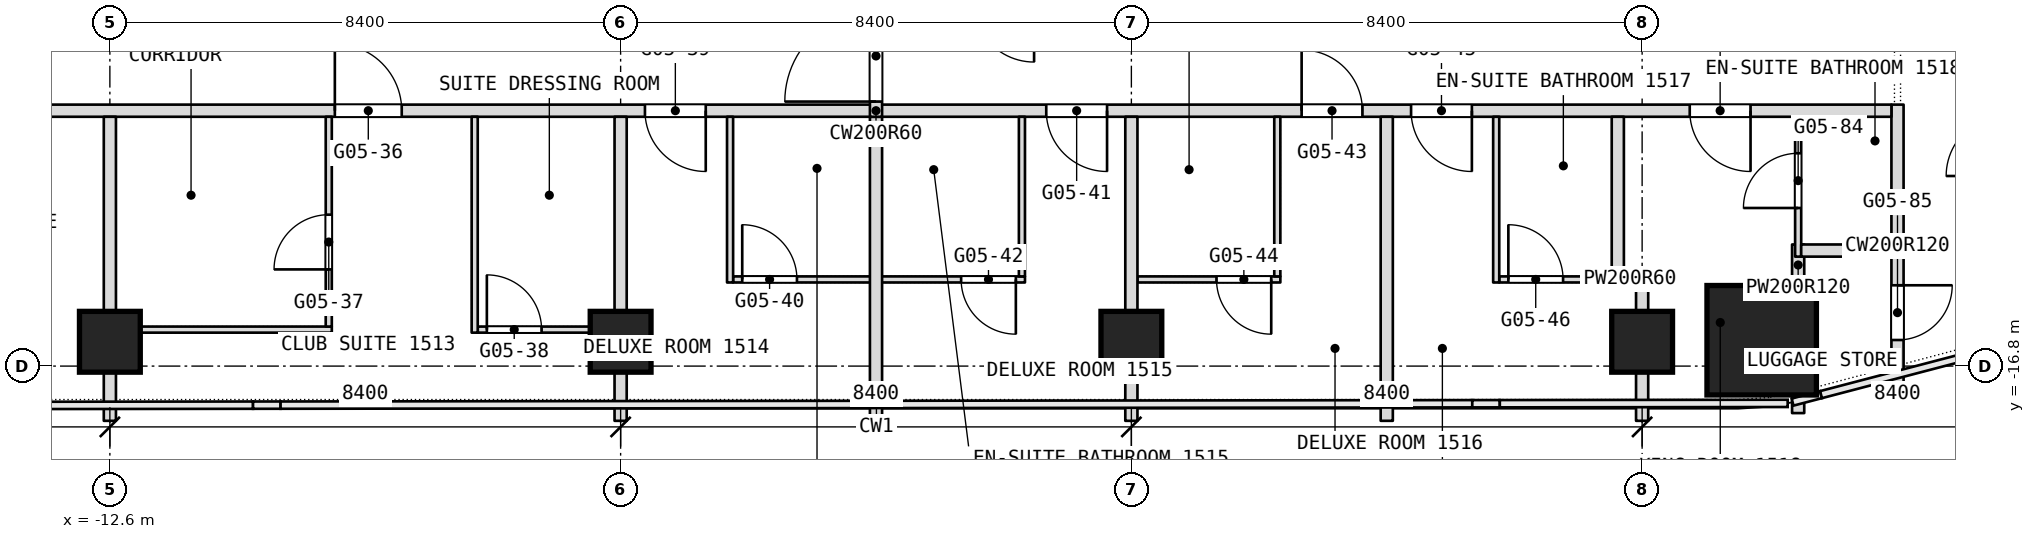
"""IFC4 building model, lengths in metres.
Left out: names, types, materials, properties, quantities, classifications, styles, units other than length and angle.
Written with IfcOpenShell. Run it as: python <this file> out.ifc"""

import sys

from ifc_helpers import new_model, si_unit, direction, frame, frame_2d, origin, origin_2d, place, context, subcontext, project, spatial, rectangle, extrude, element, fill, save


model = new_model("IFC4")
c1 = context("Model", 3, precision=1e-05, world=origin(), true_north=direction((0.0, 1.0)))
c2 = subcontext(c1, "Body", "Model", "MODEL_VIEW")
j1 = project(units=[si_unit("LENGTHUNIT", "METRE"), si_unit("PLANEANGLEUNIT", "RADIAN")], contexts=[c1])
p1 = place(None, origin())
s1 = spatial("IfcSite", under=j1, at=p1, CompositionType="ELEMENT")
p2 = place(p1, origin())
s2 = spatial("IfcBuilding", under=s1, at=p2, CompositionType="ELEMENT")
p3 = place(p2, frame((0.0, 0.0, 68.9)))
s3 = spatial("IfcBuildingStorey", under=s2, at=p3, CompositionType="ELEMENT", Elevation=68.9)
p4 = place(p3, frame((14.566, -16.375, 0.0), z_axis=(0.0, 0.0, 1.0), x_axis=(1.0, 0.0, 0.0)))
e1 = element("IfcColumn", 1, at=p4, inside=s3, PredefinedType="COLUMN", context=c2, shape_type="SweptSolid", body=[
    extrude(rectangle(XDim=1.8, YDim=1.8, at=origin_2d()), origin(), (0.0, 0.0, 1.0), 3.6),
])
for number, where, z_axis, x_axis in (
    (2, (12.6, -16.4, 0.0), (0.0, 0.0, 1.0), (1.0, 0.0, 0.0)),
    (3, (4.2, -16.4, 0.0), (0.0, 0.0, 1.0), (1.0, 0.0, 0.0)),
    (4, (-4.2, -16.4, 0.0), (0.0, 0.0, 1.0), (1.0, 0.0, 0.0)),
    (5, (-12.6, -16.4, 0.0), (0.0, 0.0, 1.0), (1.0, 0.0, 0.0)),
):
    element("IfcColumn", number, at=place(p3, frame(where, z_axis=z_axis, x_axis=x_axis)), inside=s3, PredefinedType="COLUMN", context=c2, shape_type="SweptSolid", body=[
        extrude(rectangle(XDim=1.0, YDim=1.0, at=origin_2d()), origin(), (0.0, 0.0, 1.0), 3.6),
    ])
p5 = place(p3, frame((16.8, -17.143, 0.0), z_axis=(0.0, 0.0, 1.0), x_axis=(0.0, 1.0, 0.0)))
e6 = element("IfcWall", 6, at=p5, inside=s3, PredefinedType="PARTITIONING", context=c2, shape_type="SweptSolid", body=[
    extrude(rectangle(XDim=4.643, YDim=0.2, at=frame_2d((2.322, 0.0))), origin(), (0.0, 0.0, 1.0), 3.34),
])
p6 = place(p5, frame((0.772, 0.0, 0.0)))
e7 = element("IfcOpeningElement", 7, at=p6, cuts=e6, PredefinedType="OPENING", context=c2, shape_type="SweptSolid", body=[
    extrude(rectangle(XDim=0.9, YDim=2.1, at=frame_2d((0.45, 1.05))), frame((0.0, 0.1, 0.0), z_axis=(0.0, -1.0, 0.0), x_axis=(1.0, 0.0, 0.0)), (0.0, 0.0, 1.0), 0.2),
])
p7 = place(p3, frame((-12.5, -16.2, 0.0), z_axis=(0.0, 0.0, 1.0), x_axis=(1.0, 0.0, 0.0)))
e8 = element("IfcWall", 8, at=p7, inside=s3, PredefinedType="PARTITIONING", context=c2, shape_type="SweptSolid", body=[
    extrude(rectangle(XDim=3.55, YDim=0.1, at=frame_2d((1.775, 0.0))), origin(), (0.0, 0.0, 1.0), 2.94),
])
p8 = place(p3, frame((-6.55, -16.2, 0.0), z_axis=(0.0, 0.0, 1.0), x_axis=(1.0, 0.0, 0.0)))
e9 = element("IfcWall", 9, at=p8, inside=s3, PredefinedType="PARTITIONING", context=c2, shape_type="SweptSolid", body=[
    extrude(rectangle(XDim=2.45, YDim=0.1, at=frame_2d((1.225, 0.0))), origin(), (0.0, 0.0, 1.0), 2.94),
])
p9 = place(p8, frame((0.15, 0.0, 0.0)))
e10 = element("IfcOpeningElement", 10, at=p9, cuts=e9, PredefinedType="OPENING", context=c2, shape_type="SweptSolid", body=[
    extrude(rectangle(XDim=0.9, YDim=2.1, at=frame_2d((0.45, 1.05))), frame((0.0, 0.05, 0.0), z_axis=(0.0, -1.0, 0.0), x_axis=(1.0, 0.0, 0.0)), (0.0, 0.0, 1.0), 0.1),
])
p10 = place(p3, frame((-2.35, -15.375, 0.0), z_axis=(0.0, 0.0, 1.0), x_axis=(1.0, 0.0, 0.0)))
e11 = element("IfcWall", 11, at=p10, inside=s3, PredefinedType="PARTITIONING", context=c2, shape_type="SweptSolid", body=[
    extrude(rectangle(XDim=4.8, YDim=0.1, at=frame_2d((2.4, 0.0))), origin(), (0.0, 0.0, 1.0), 3.34),
])
p11 = place(p10, frame((0.15, 0.0, 0.0)))
e12 = element("IfcOpeningElement", 12, at=p11, cuts=e11, PredefinedType="OPENING", context=c2, shape_type="SweptSolid", body=[
    extrude(rectangle(XDim=0.9, YDim=2.1, at=frame_2d((0.45, 1.05))), frame((0.0, 0.05, 0.0), z_axis=(0.0, -1.0, 0.0), x_axis=(1.0, 0.0, 0.0)), (0.0, 0.0, 1.0), 0.1),
])
p12 = place(p10, frame((3.75, 0.0, 0.0)))
e13 = element("IfcOpeningElement", 13, at=p12, cuts=e11, PredefinedType="OPENING", context=c2, shape_type="SweptSolid", body=[
    extrude(rectangle(XDim=0.9, YDim=2.1, at=frame_2d((0.45, 1.05))), frame((0.0, 0.05, 0.0), z_axis=(0.0, -1.0, 0.0), x_axis=(1.0, 0.0, 0.0)), (0.0, 0.0, 1.0), 0.1),
])
p13 = place(p3, frame((4.3, -15.375, 0.0), z_axis=(0.0, 0.0, 1.0), x_axis=(1.0, 0.0, 0.0)))
e14 = element("IfcWall", 14, at=p13, inside=s3, PredefinedType="PARTITIONING", context=c2, shape_type="SweptSolid", body=[
    extrude(rectangle(XDim=2.35, YDim=0.1, at=frame_2d((1.175, 0.0))), origin(), (0.0, 0.0, 1.0), 3.34),
])
p14 = place(p13, frame((1.3, 0.0, 0.0)))
e15 = element("IfcOpeningElement", 15, at=p14, cuts=e14, PredefinedType="OPENING", context=c2, shape_type="SweptSolid", body=[
    extrude(rectangle(XDim=0.9, YDim=2.1, at=frame_2d((0.45, 1.05))), frame((0.0, 0.05, 0.0), z_axis=(0.0, -1.0, 0.0), x_axis=(1.0, 0.0, 0.0)), (0.0, 0.0, 1.0), 0.1),
])
p15 = place(p3, frame((10.25, -15.375, 0.0), z_axis=(0.0, 0.0, 1.0), x_axis=(1.0, 0.0, 0.0)))
e16 = element("IfcWall", 16, at=p15, inside=s3, PredefinedType="PARTITIONING", context=c2, shape_type="SweptSolid", body=[
    extrude(rectangle(XDim=2.05, YDim=0.1, at=frame_2d((1.025, 0.0))), origin(), (0.0, 0.0, 1.0), 3.34),
])
p16 = place(p15, frame((0.15, 0.0, 0.0)))
e17 = element("IfcOpeningElement", 17, at=p16, cuts=e16, PredefinedType="OPENING", context=c2, shape_type="SweptSolid", body=[
    extrude(rectangle(XDim=0.9, YDim=2.1, at=frame_2d((0.45, 1.05))), frame((0.0, 0.05, 0.0), z_axis=(0.0, -1.0, 0.0), x_axis=(1.0, 0.0, 0.0)), (0.0, 0.0, 1.0), 0.1),
])
p17 = place(p3, frame((12.1, -15.375, 0.0), z_axis=(0.0, 0.0, 1.0), x_axis=(1.0, 0.0, 0.0)))
e18 = element("IfcWall", 18, at=p17, inside=s3, PredefinedType="PARTITIONING", context=c2, shape_type="SweptSolid", body=[
    extrude(rectangle(XDim=0.6, YDim=0.2, at=frame_2d((0.3, 0.0))), origin(), (0.0, 0.0, 1.0), 3.34),
])
p18 = place(p3, frame((15.166, -17.573, 0.0), z_axis=(0.0, 0.0, 1.0), x_axis=(0.0, 1.0, 0.0)))
e19 = element("IfcWall", 19, at=p18, inside=s3, PredefinedType="PARTITIONING", context=c2, shape_type="SweptSolid", body=[
    extrude(rectangle(XDim=0.298, YDim=0.2, at=frame_2d((0.149, 0.0))), origin(), (0.0, 0.0, 1.0), 3.34),
])
p19 = place(p3, frame((15.166, -15.475, 0.0), z_axis=(0.0, 0.0, 1.0), x_axis=(0.0, 1.0, 0.0)))
e20 = element("IfcWall", 20, at=p19, inside=s3, PredefinedType="PARTITIONING", context=c2, shape_type="SweptSolid", body=[
    extrude(rectangle(XDim=0.675, YDim=0.2, at=frame_2d((0.337, 0.0))), origin(), (0.0, 0.0, 1.0), 3.34),
])
p20 = place(p3, frame((15.166, -15.0, 0.0), z_axis=(0.0, 0.0, 1.0), x_axis=(0.0, 1.0, 0.0)))
e21 = element("IfcWall", 21, at=p20, inside=s3, PredefinedType="PARTITIONING", context=c2, shape_type="SweptSolid", body=[
    extrude(rectangle(XDim=2.3, YDim=0.1, at=frame_2d((1.15, 0.0))), origin(), (0.0, 0.0, 1.0), 3.34),
])
p21 = place(p20, frame((0.8, 0.0, 0.0)))
e22 = element("IfcOpeningElement", 22, at=p21, cuts=e21, PredefinedType="OPENING", context=c2, shape_type="SweptSolid", body=[
    extrude(rectangle(XDim=0.9, YDim=2.1, at=frame_2d((0.45, 1.05))), frame((0.0, 0.05, 0.0), z_axis=(0.0, -1.0, 0.0), x_axis=(1.0, 0.0, 0.0)), (0.0, 0.0, 1.0), 0.1),
])
p22 = place(p3, frame((15.216, -14.9, 0.0), z_axis=(0.0, 0.0, 1.0), x_axis=(1.0, 0.0, 0.0)))
e23 = element("IfcWall", 23, at=p22, inside=s3, PredefinedType="PARTITIONING", context=c2, shape_type="SweptSolid", body=[
    extrude(rectangle(XDim=1.484, YDim=0.2, at=frame_2d((0.742, 0.0))), origin(), (0.0, 0.0, 1.0), 3.34),
])
p23 = place(p3, frame((12.6, -17.7, 0.0), z_axis=(0.0, 0.0, 1.0), x_axis=(0.0, 1.0, 0.0)))
e24 = element("IfcWall", 24, at=p23, inside=s3, PredefinedType="PARTITIONING", context=c2, shape_type="SweptSolid", body=[
    extrude(rectangle(XDim=2.225, YDim=0.2, at=frame_2d((1.112, 0.0))), origin(), (0.0, 0.0, 1.0), 3.34),
])
p24 = place(p3, frame((-16.7, -12.6, 0.0), z_axis=(0.0, 0.0, 1.0), x_axis=(1.0, 0.0, 0.0)))
e25 = element("IfcWall", 25, at=p24, inside=s3, PredefinedType="PARTITIONING", context=c2, shape_type="SweptSolid", body=[
    extrude(rectangle(XDim=33.4, YDim=0.2, at=frame_2d((16.7, 0.0))), origin(), (0.0, 0.0, 1.0), 3.34),
])
p25 = place(p24, frame((1.5, 0.0, 0.0)))
e26 = element("IfcOpeningElement", 26, at=p25, cuts=e25, PredefinedType="OPENING", context=c2, shape_type="SweptSolid", body=[
    extrude(rectangle(XDim=1.0, YDim=2.1, at=frame_2d((0.5, 1.05))), frame((0.0, 0.1, 0.0), z_axis=(0.0, -1.0, 0.0), x_axis=(1.0, 0.0, 0.0)), (0.0, 0.0, 1.0), 0.2),
])
p26 = place(p24, frame((7.8, 0.0, 0.0)))
e27 = element("IfcOpeningElement", 27, at=p26, cuts=e25, PredefinedType="OPENING", context=c2, shape_type="SweptSolid", body=[
    extrude(rectangle(XDim=1.1, YDim=2.1, at=frame_2d((0.55, 1.05))), frame((0.0, 0.1, 0.0), z_axis=(0.0, -1.0, 0.0), x_axis=(1.0, 0.0, 0.0)), (0.0, 0.0, 1.0), 0.2),
])
p27 = place(p24, frame((12.9, 0.0, 0.0)))
e28 = element("IfcOpeningElement", 28, at=p27, cuts=e25, PredefinedType="OPENING", context=c2, shape_type="SweptSolid", body=[
    extrude(rectangle(XDim=1.0, YDim=2.1, at=frame_2d((0.5, 1.05))), frame((0.0, 0.1, 0.0), z_axis=(0.0, -1.0, 0.0), x_axis=(1.0, 0.0, 0.0)), (0.0, 0.0, 1.0), 0.2),
])
p28 = place(p24, frame((19.5, 0.0, 0.0)))
e29 = element("IfcOpeningElement", 29, at=p28, cuts=e25, PredefinedType="OPENING", context=c2, shape_type="SweptSolid", body=[
    extrude(rectangle(XDim=1.0, YDim=2.1, at=frame_2d((0.5, 1.05))), frame((0.0, 0.1, 0.0), z_axis=(0.0, -1.0, 0.0), x_axis=(1.0, 0.0, 0.0)), (0.0, 0.0, 1.0), 0.2),
])
p29 = place(p24, frame((23.7, 0.0, 0.0)))
e30 = element("IfcOpeningElement", 30, at=p29, cuts=e25, PredefinedType="OPENING", context=c2, shape_type="SweptSolid", body=[
    extrude(rectangle(XDim=1.0, YDim=2.1, at=frame_2d((0.5, 1.05))), frame((0.0, 0.1, 0.0), z_axis=(0.0, -1.0, 0.0), x_axis=(1.0, 0.0, 0.0)), (0.0, 0.0, 1.0), 0.2),
])
p30 = place(p24, frame((25.5, 0.0, 0.0)))
e31 = element("IfcOpeningElement", 31, at=p30, cuts=e25, PredefinedType="OPENING", context=c2, shape_type="SweptSolid", body=[
    extrude(rectangle(XDim=1.0, YDim=2.1, at=frame_2d((0.5, 1.05))), frame((0.0, 0.1, 0.0), z_axis=(0.0, -1.0, 0.0), x_axis=(1.0, 0.0, 0.0)), (0.0, 0.0, 1.0), 0.2),
])
p31 = place(p24, frame((30.083, 0.0, 0.0)))
e32 = element("IfcOpeningElement", 32, at=p31, cuts=e25, PredefinedType="OPENING", context=c2, shape_type="SweptSolid", body=[
    extrude(rectangle(XDim=1.0, YDim=2.1, at=frame_2d((0.5, 1.05))), frame((0.0, 0.1, 0.0), z_axis=(0.0, -1.0, 0.0), x_axis=(1.0, 0.0, 0.0)), (0.0, 0.0, 1.0), 0.2),
])
p32 = place(p3, frame((12.2, -15.325, 0.0), z_axis=(0.0, 0.0, 1.0), x_axis=(0.0, 1.0, 0.0)))
e33 = element("IfcWall", 33, at=p32, inside=s3, PredefinedType="PARTITIONING", context=c2, shape_type="SweptSolid", body=[
    extrude(rectangle(XDim=2.625, YDim=0.2, at=frame_2d((1.312, 0.0))), origin(), (0.0, 0.0, 1.0), 3.34),
])
p33 = place(p3, frame((10.2, -15.425, 0.0), z_axis=(0.0, 0.0, 1.0), x_axis=(0.0, 1.0, 0.0)))
e34 = element("IfcWall", 34, at=p33, inside=s3, PredefinedType="PARTITIONING", context=c2, shape_type="SweptSolid", body=[
    extrude(rectangle(XDim=2.725, YDim=0.1, at=frame_2d((1.363, 0.0))), origin(), (0.0, 0.0, 1.0), 3.34),
])
p34 = place(p3, frame((8.4, -17.7, 0.0), z_axis=(0.0, 0.0, 1.0), x_axis=(0.0, 1.0, 0.0)))
e35 = element("IfcWall", 35, at=p34, inside=s3, PredefinedType="PARTITIONING", context=c2, shape_type="SweptSolid", body=[
    extrude(rectangle(XDim=5.0, YDim=0.2, at=frame_2d((2.5, 0.0))), origin(), (0.0, 0.0, 1.0), 3.34),
])
p35 = place(p3, frame((6.6, -15.325, 0.0), z_axis=(0.0, 0.0, 1.0), x_axis=(0.0, 1.0, 0.0)))
e36 = element("IfcWall", 36, at=p35, inside=s3, PredefinedType="PARTITIONING", context=c2, shape_type="SweptSolid", body=[
    extrude(rectangle(XDim=2.625, YDim=0.1, at=frame_2d((1.312, 0.0))), origin(), (0.0, 0.0, 1.0), 3.34),
])
p36 = place(p3, frame((4.2, -17.7, 0.0), z_axis=(0.0, 0.0, 1.0), x_axis=(0.0, 1.0, 0.0)))
e37 = element("IfcWall", 37, at=p36, inside=s3, PredefinedType="PARTITIONING", context=c2, shape_type="SweptSolid", body=[
    extrude(rectangle(XDim=5.0, YDim=0.2, at=frame_2d((2.5, 0.0))), origin(), (0.0, 0.0, 1.0), 3.34),
])
p37 = place(p3, frame((2.4, -15.325, 0.0), z_axis=(0.0, 0.0, 1.0), x_axis=(0.0, 1.0, 0.0)))
e38 = element("IfcWall", 38, at=p37, inside=s3, PredefinedType="PARTITIONING", context=c2, shape_type="SweptSolid", body=[
    extrude(rectangle(XDim=2.625, YDim=0.1, at=frame_2d((1.312, 0.0))), origin(), (0.0, 0.0, 1.0), 3.34),
])
p38 = place(p3, frame((0.0, -17.7, 0.0), z_axis=(0.0, 0.0, 1.0), x_axis=(0.0, 1.0, 0.0)))
e39 = element("IfcWall", 39, at=p38, inside=s3, PredefinedType="PARTITIONING", context=c2, shape_type="SweptSolid", body=[
    extrude(rectangle(XDim=5.0, YDim=0.2, at=frame_2d((2.5, 0.0))), origin(), (0.0, 0.0, 1.0), 3.34),
])
p39 = place(p3, frame((0.0, -12.7, 0.0), z_axis=(0.0, 0.0, 1.0), x_axis=(0.0, 1.0, 0.0)))
e40 = element("IfcWall", 40, at=p39, inside=s3, PredefinedType="PARTITIONING", context=c2, shape_type="SweptSolid", body=[
    extrude(rectangle(XDim=12.7, YDim=0.2, at=frame_2d((6.35, 0.0))), origin(), (0.0, 0.0, 1.0), 3.34),
])
p40 = place(p39, frame((11.05, 0.0, 0.0)))
e41 = element("IfcOpeningElement", 41, at=p40, cuts=e40, PredefinedType="OPENING", context=c2, shape_type="SweptSolid", body=[
    extrude(rectangle(XDim=1.5, YDim=2.1, at=frame_2d((0.75, 1.05))), frame((0.0, 0.1, 0.0), z_axis=(0.0, -1.0, 0.0), x_axis=(1.0, 0.0, 0.0)), (0.0, 0.0, 1.0), 0.2),
])
p41 = place(p39, frame((0.25, 0.0, 0.0)))
e42 = element("IfcOpeningElement", 42, at=p41, cuts=e40, PredefinedType="OPENING", context=c2, shape_type="SweptSolid", body=[
    extrude(rectangle(XDim=1.5, YDim=2.1, at=frame_2d((0.75, 1.05))), frame((0.0, 0.1, 0.0), z_axis=(0.0, -1.0, 0.0), x_axis=(1.0, 0.0, 0.0)), (0.0, 0.0, 1.0), 0.2),
])
p42 = place(p3, frame((-2.4, -15.425, 0.0), z_axis=(0.0, 0.0, 1.0), x_axis=(0.0, 1.0, 0.0)))
e43 = element("IfcWall", 43, at=p42, inside=s3, PredefinedType="PARTITIONING", context=c2, shape_type="SweptSolid", body=[
    extrude(rectangle(XDim=2.725, YDim=0.1, at=frame_2d((1.363, 0.0))), origin(), (0.0, 0.0, 1.0), 3.34),
])
p43 = place(p3, frame((-4.2, -17.7, 0.0), z_axis=(0.0, 0.0, 1.0), x_axis=(0.0, 1.0, 0.0)))
e44 = element("IfcWall", 44, at=p43, inside=s3, PredefinedType="PARTITIONING", context=c2, shape_type="SweptSolid", body=[
    extrude(rectangle(XDim=5.0, YDim=0.2, at=frame_2d((2.5, 0.0))), origin(), (0.0, 0.0, 1.0), 3.34),
])
p44 = place(p3, frame((-6.6, -16.25, 0.0), z_axis=(0.0, 0.0, 1.0), x_axis=(0.0, 1.0, 0.0)))
e45 = element("IfcWall", 45, at=p44, inside=s3, PredefinedType="PARTITIONING", context=c2, shape_type="SweptSolid", body=[
    extrude(rectangle(XDim=3.55, YDim=0.1, at=frame_2d((1.775, 0.0))), origin(), (0.0, 0.0, 1.0), 3.34),
])
p45 = place(p3, frame((-9.0, -16.15, 0.0), z_axis=(0.0, 0.0, 1.0), x_axis=(0.0, 1.0, 0.0)))
e46 = element("IfcWall", 46, at=p45, inside=s3, PredefinedType="PARTITIONING", context=c2, shape_type="SweptSolid", body=[
    extrude(rectangle(XDim=3.45, YDim=0.1, at=frame_2d((1.725, 0.0))), origin(), (0.0, 0.0, 1.0), 3.34),
])
p46 = place(p45, frame((0.94, 0.0, 0.0)))
e47 = element("IfcOpeningElement", 47, at=p46, cuts=e46, PredefinedType="OPENING", context=c2, shape_type="SweptSolid", body=[
    extrude(rectangle(XDim=0.9, YDim=2.1, at=frame_2d((0.45, 1.05))), frame((0.0, 0.05, 0.0), z_axis=(0.0, -1.0, 0.0), x_axis=(1.0, 0.0, 0.0)), (0.0, 0.0, 1.0), 0.1),
])
p47 = place(p3, frame((-12.6, -17.7, 0.0), z_axis=(0.0, 0.0, 1.0), x_axis=(0.0, 1.0, 0.0)))
e48 = element("IfcWall", 48, at=p47, inside=s3, PredefinedType="PARTITIONING", context=c2, shape_type="SweptSolid", body=[
    extrude(rectangle(XDim=5.0, YDim=0.2, at=frame_2d((2.5, 0.0))), origin(), (0.0, 0.0, 1.0), 3.34),
])
p48 = place(p6, origin())
e49 = element("IfcDoor", 49, at=p48, inside=s3, OperationType="SINGLE_SWING_RIGHT", PredefinedType="DOOR", context=c2, shape_type="SweptSolid", body=[
    extrude(rectangle(XDim=0.9, YDim=2.1, at=frame_2d((0.45, 1.05))), frame((0.0, 0.025, 0.0), z_axis=(0.0, -1.0, 0.0), x_axis=(1.0, 0.0, 0.0)), (0.0, 0.0, 1.0), 0.05),
])
fill(e7, e49)
p49 = place(p9, origin())
e50 = element("IfcDoor", 50, at=p49, inside=s3, OperationType="SINGLE_SWING_LEFT", PredefinedType="DOOR", context=c2, shape_type="SweptSolid", body=[
    extrude(rectangle(XDim=0.9, YDim=2.1, at=frame_2d((0.45, 1.05))), frame((0.0, 0.025, 0.0), z_axis=(0.0, -1.0, 0.0), x_axis=(1.0, 0.0, 0.0)), (0.0, 0.0, 1.0), 0.05),
])
fill(e10, e50)
p50 = place(p11, origin())
e51 = element("IfcDoor", 51, at=p50, inside=s3, OperationType="SINGLE_SWING_LEFT", PredefinedType="DOOR", context=c2, shape_type="SweptSolid", body=[
    extrude(rectangle(XDim=0.9, YDim=2.1, at=frame_2d((0.45, 1.05))), frame((0.0, 0.025, 0.0), z_axis=(0.0, -1.0, 0.0), x_axis=(1.0, 0.0, 0.0)), (0.0, 0.0, 1.0), 0.05),
])
fill(e12, e51)
p51 = place(p12, origin())
e52 = element("IfcDoor", 52, at=p51, inside=s3, OperationType="SINGLE_SWING_RIGHT", PredefinedType="DOOR", context=c2, shape_type="SweptSolid", body=[
    extrude(rectangle(XDim=0.9, YDim=2.1, at=frame_2d((0.45, 1.05))), frame((0.0, 0.025, 0.0), z_axis=(0.0, -1.0, 0.0), x_axis=(1.0, 0.0, 0.0)), (0.0, 0.0, 1.0), 0.05),
])
fill(e13, e52)
p52 = place(p14, origin())
e53 = element("IfcDoor", 53, at=p52, inside=s3, OperationType="SINGLE_SWING_RIGHT", PredefinedType="DOOR", context=c2, shape_type="SweptSolid", body=[
    extrude(rectangle(XDim=0.9, YDim=2.1, at=frame_2d((0.45, 1.05))), frame((0.0, 0.025, 0.0), z_axis=(0.0, -1.0, 0.0), x_axis=(1.0, 0.0, 0.0)), (0.0, 0.0, 1.0), 0.05),
])
fill(e15, e53)
p53 = place(p16, origin())
e54 = element("IfcDoor", 54, at=p53, inside=s3, OperationType="SINGLE_SWING_LEFT", PredefinedType="DOOR", context=c2, shape_type="SweptSolid", body=[
    extrude(rectangle(XDim=0.9, YDim=2.1, at=frame_2d((0.45, 1.05))), frame((0.0, 0.025, 0.0), z_axis=(0.0, -1.0, 0.0), x_axis=(1.0, 0.0, 0.0)), (0.0, 0.0, 1.0), 0.05),
])
fill(e17, e54)
p54 = place(p21, origin())
e55 = element("IfcDoor", 55, at=p54, inside=s3, OperationType="SINGLE_SWING_RIGHT", PredefinedType="DOOR", context=c2, shape_type="SweptSolid", body=[
    extrude(rectangle(XDim=0.9, YDim=2.1, at=frame_2d((0.45, 1.05))), frame((0.0, 0.025, 0.0), z_axis=(0.0, -1.0, 0.0), x_axis=(1.0, 0.0, 0.0)), (0.0, 0.0, 1.0), 0.05),
])
fill(e22, e55)
p55 = place(p26, origin())
e56 = element("IfcDoor", 56, at=p55, inside=s3, OperationType="SINGLE_SWING_RIGHT", PredefinedType="DOOR", context=c2, shape_type="SweptSolid", body=[
    extrude(rectangle(XDim=1.1, YDim=2.1, at=frame_2d((0.55, 1.05))), frame((0.0, 0.025, 0.0), z_axis=(0.0, -1.0, 0.0), x_axis=(1.0, 0.0, 0.0)), (0.0, 0.0, 1.0), 0.05),
])
fill(e27, e56)
p56 = place(p27, origin())
e57 = element("IfcDoor", 57, at=p56, inside=s3, OperationType="SINGLE_SWING_LEFT", PredefinedType="DOOR", context=c2, shape_type="SweptSolid", body=[
    extrude(rectangle(XDim=1.0, YDim=2.1, at=frame_2d((0.5, 1.05))), frame((0.0, 0.025, 0.0), z_axis=(0.0, -1.0, 0.0), x_axis=(1.0, 0.0, 0.0)), (0.0, 0.0, 1.0), 0.05),
])
fill(e28, e57)
p57 = place(p28, origin())
e58 = element("IfcDoor", 58, at=p57, inside=s3, OperationType="SINGLE_SWING_LEFT", PredefinedType="DOOR", context=c2, shape_type="SweptSolid", body=[
    extrude(rectangle(XDim=1.0, YDim=2.1, at=frame_2d((0.5, 1.05))), frame((0.0, 0.025, 0.0), z_axis=(0.0, -1.0, 0.0), x_axis=(1.0, 0.0, 0.0)), (0.0, 0.0, 1.0), 0.05),
])
fill(e29, e58)
p58 = place(p29, origin())
e59 = element("IfcDoor", 59, at=p58, inside=s3, OperationType="SINGLE_SWING_LEFT", PredefinedType="DOOR", context=c2, shape_type="SweptSolid", body=[
    extrude(rectangle(XDim=1.0, YDim=2.1, at=frame_2d((0.5, 1.05))), frame((0.0, 0.025, 0.0), z_axis=(0.0, -1.0, 0.0), x_axis=(1.0, 0.0, 0.0)), (0.0, 0.0, 1.0), 0.05),
])
fill(e30, e59)
p59 = place(p30, origin())
e60 = element("IfcDoor", 60, at=p59, inside=s3, OperationType="SINGLE_SWING_LEFT", PredefinedType="DOOR", context=c2, shape_type="SweptSolid", body=[
    extrude(rectangle(XDim=1.0, YDim=2.1, at=frame_2d((0.5, 1.05))), frame((0.0, 0.025, 0.0), z_axis=(0.0, -1.0, 0.0), x_axis=(1.0, 0.0, 0.0)), (0.0, 0.0, 1.0), 0.05),
])
fill(e31, e60)
p60 = place(p31, origin())
e61 = element("IfcDoor", 61, at=p60, inside=s3, OperationType="SINGLE_SWING_LEFT", PredefinedType="DOOR", context=c2, shape_type="SweptSolid", body=[
    extrude(rectangle(XDim=1.0, YDim=2.1, at=frame_2d((0.5, 1.05))), frame((0.0, 0.025, 0.0), z_axis=(0.0, -1.0, 0.0), x_axis=(1.0, 0.0, 0.0)), (0.0, 0.0, 1.0), 0.05),
])
fill(e32, e61)
p61 = place(p46, origin())
e62 = element("IfcDoor", 62, at=p61, inside=s3, OperationType="SINGLE_SWING_LEFT", PredefinedType="DOOR", context=c2, shape_type="SweptSolid", body=[
    extrude(rectangle(XDim=0.9, YDim=2.1, at=frame_2d((0.45, 1.05))), frame((0.0, 0.025, 0.0), z_axis=(0.0, -1.0, 0.0), x_axis=(1.0, 0.0, 0.0)), (0.0, 0.0, 1.0), 0.05),
])
fill(e47, e62)
p62 = place(p41, origin())
e63 = element("IfcDoor", 63, at=p62, inside=s3, OperationType="DOUBLE_DOOR_DOUBLE_SWING", PredefinedType="DOOR", context=c2, shape_type="SweptSolid", body=[
    extrude(rectangle(XDim=1.5, YDim=2.1, at=frame_2d((0.75, 1.05))), frame((0.0, 0.025, 0.0), z_axis=(0.0, -1.0, 0.0), x_axis=(1.0, 0.0, 0.0)), (0.0, 0.0, 1.0), 0.05),
])
fill(e42, e63)
save(model, sys.argv[1])
